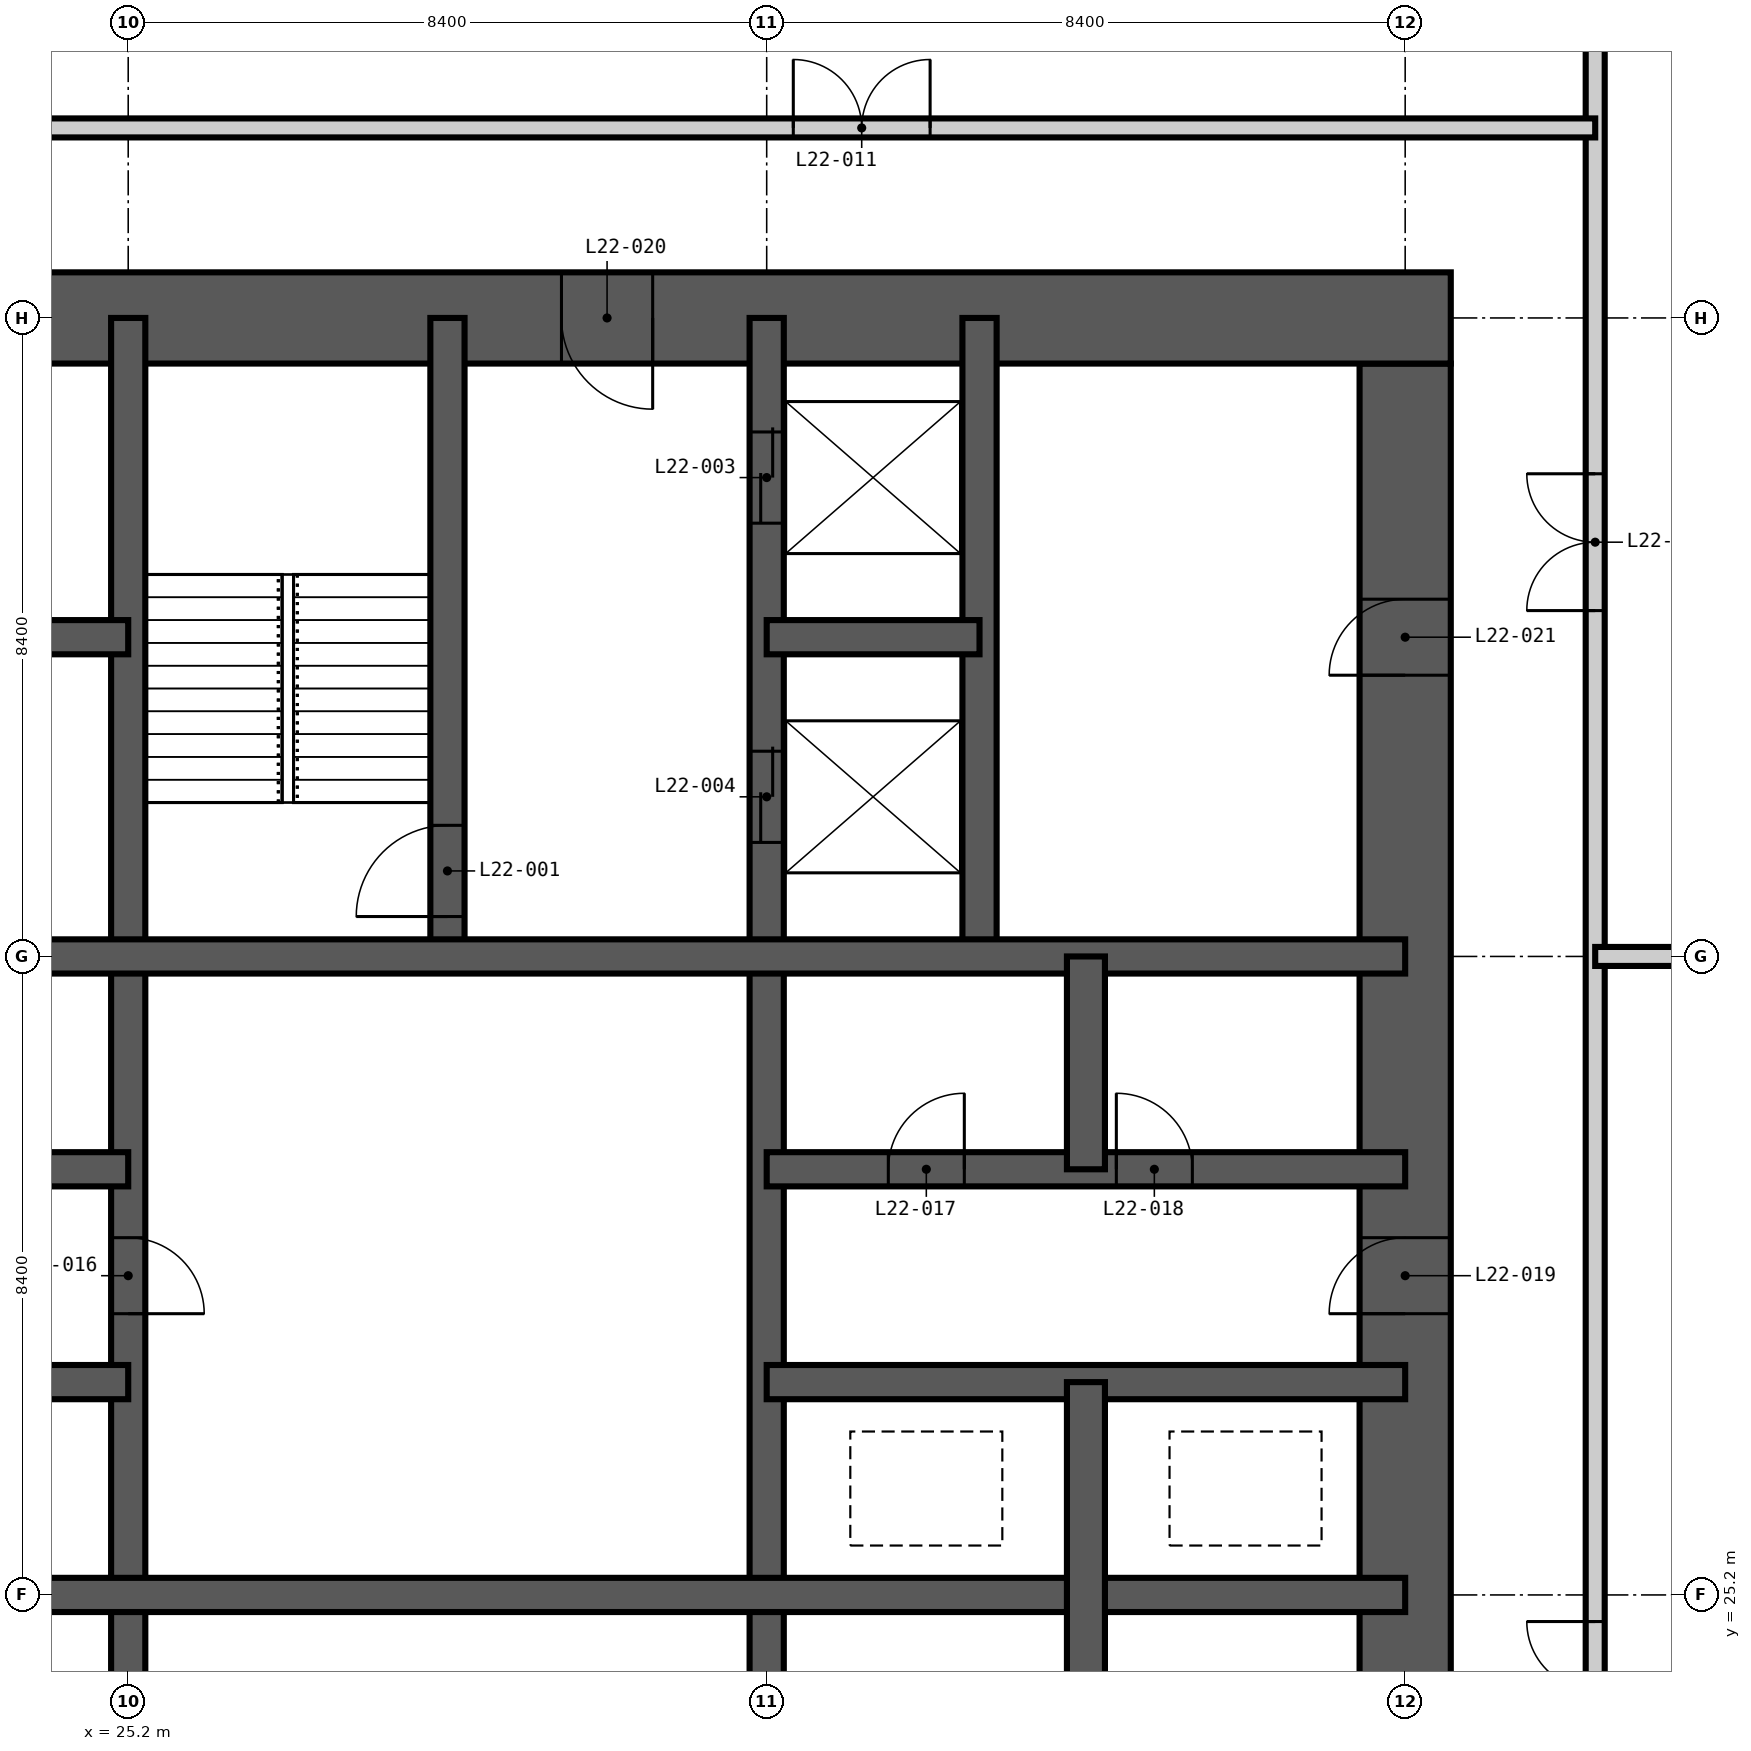
"""IFC4 building model, lengths in metres.
Left out: names, types, materials, properties, quantities, classifications, styles, units other than length and angle.
Written with IfcOpenShell. Run it as: python <this file> out.ifc"""

import sys

from ifc_helpers import new_model, si_unit, direction, frame, frame_2d, origin, place, context, subcontext, project, spatial, rectangle, extrude, element, fill, save


model = new_model("IFC4")
c1 = context("Model", 3, precision=1e-05, world=origin(), true_north=direction((0.0, 1.0)))
c2 = subcontext(c1, "Body", "Model", "MODEL_VIEW")
j1 = project(units=[si_unit("LENGTHUNIT", "METRE"), si_unit("PLANEANGLEUNIT", "RADIAN")], contexts=[c1])
p1 = place(None, origin())
s1 = spatial("IfcSite", under=j1, at=p1, CompositionType="ELEMENT")
p2 = place(p1, origin())
s2 = spatial("IfcBuilding", under=s1, at=p2, CompositionType="ELEMENT")
p3 = place(p2, frame((0.0, 0.0, 88.2)))
s3 = spatial("IfcBuildingStorey", under=s2, at=p3, CompositionType="ELEMENT", Elevation=88.2)
p4 = place(p3, frame((42.0, 17.4, -0.4), z_axis=(0.0, 0.0, 1.0), x_axis=(0.0, 1.0, 0.0)))
e1 = element("IfcWall", 1, at=p4, inside=s3, PredefinedType="SHEAR", context=c2, shape_type="SweptSolid", body=[
    extrude(rectangle(XDim=24.0, YDim=1.2, at=frame_2d((12.0, 0.0))), origin(), (0.0, 0.0, 1.0), 5.45),
])
p5 = place(p4, frame((0.2, 0.0, 0.4)))
e2 = element("IfcOpeningElement", 2, at=p5, cuts=e1, PredefinedType="OPENING", context=c2, shape_type="SweptSolid", body=[
    extrude(rectangle(XDim=1.2, YDim=2.2, at=frame_2d((0.6, 1.1))), frame((0.0, 0.61, 0.0), z_axis=(0.0, -1.0, 0.0), x_axis=(1.0, 0.0, 0.0)), (0.0, 0.0, 1.0), 1.22),
])
p6 = place(p4, frame((11.5, 0.0, 0.4)))
e3 = element("IfcOpeningElement", 3, at=p6, cuts=e1, PredefinedType="OPENING", context=c2, shape_type="SweptSolid", body=[
    extrude(rectangle(XDim=1.0, YDim=2.1, at=frame_2d((0.5, 1.05))), frame((0.0, 0.61, 0.0), z_axis=(0.0, -1.0, 0.0), x_axis=(1.0, 0.0, 0.0)), (0.0, 0.0, 1.0), 1.22),
])
p7 = place(p4, frame((19.9, 0.0, 0.4)))
e4 = element("IfcOpeningElement", 4, at=p7, cuts=e1, PredefinedType="OPENING", context=c2, shape_type="SweptSolid", body=[
    extrude(rectangle(XDim=1.0, YDim=2.1, at=frame_2d((0.5, 1.05))), frame((0.0, 0.61, 0.0), z_axis=(0.0, -1.0, 0.0), x_axis=(1.0, 0.0, 0.0)), (0.0, 0.0, 1.0), 1.22),
])
p8 = place(p3, frame((42.6, 42.0, -0.4), z_axis=(0.0, 0.0, 1.0), x_axis=(-1.0, 0.0, 0.0)))
e5 = element("IfcWall", 5, at=p8, inside=s3, PredefinedType="SHEAR", context=c2, shape_type="SweptSolid", body=[
    extrude(rectangle(XDim=26.4, YDim=1.2, at=frame_2d((13.2, 0.0))), origin(), (0.0, 0.0, 1.0), 5.45),
])
p9 = place(p8, frame((21.1, 0.0, 0.4)))
e6 = element("IfcOpeningElement", 6, at=p9, cuts=e5, PredefinedType="OPENING", context=c2, shape_type="SweptSolid", body=[
    extrude(rectangle(XDim=1.0, YDim=2.1, at=frame_2d((0.5, 1.05))), frame((0.0, 0.61, 0.0), z_axis=(0.0, -1.0, 0.0), x_axis=(1.0, 0.0, 0.0)), (0.0, 0.0, 1.0), 1.22),
])
p10 = place(p8, frame((10.5, 0.0, 0.4)))
e7 = element("IfcOpeningElement", 7, at=p10, cuts=e5, PredefinedType="OPENING", context=c2, shape_type="SweptSolid", body=[
    extrude(rectangle(XDim=1.2, YDim=2.2, at=frame_2d((0.6, 1.1))), frame((0.0, 0.61, 0.0), z_axis=(0.0, -1.0, 0.0), x_axis=(1.0, 0.0, 0.0)), (0.0, 0.0, 1.0), 1.22),
])
p11 = place(p3, frame((25.2, 16.8, -0.4), z_axis=(0.0, 0.0, 1.0), x_axis=(0.0, 1.0, 0.0)))
e8 = element("IfcWall", 8, at=p11, inside=s3, PredefinedType="SHEAR", context=c2, shape_type="SweptSolid", body=[
    extrude(rectangle(XDim=25.2, YDim=0.45, at=frame_2d((12.6, 0.0))), origin(), (0.0, 0.0, 1.0), 5.45),
])
p12 = place(p11, frame((12.1, 0.0, 0.4)))
e9 = element("IfcOpeningElement", 9, at=p12, cuts=e8, PredefinedType="OPENING", context=c2, shape_type="SweptSolid", body=[
    extrude(rectangle(XDim=1.0, YDim=2.1, at=frame_2d((0.5, 1.05))), frame((0.0, 0.235, 0.0), z_axis=(0.0, -1.0, 0.0), x_axis=(1.0, 0.0, 0.0)), (0.0, 0.0, 1.0), 0.47),
])
p13 = place(p3, frame((29.4, 33.6, -0.4), z_axis=(0.0, 0.0, 1.0), x_axis=(0.0, 1.0, 0.0)))
e10 = element("IfcWall", 10, at=p13, inside=s3, PredefinedType="SHEAR", context=c2, shape_type="SweptSolid", body=[
    extrude(rectangle(XDim=8.4, YDim=0.45, at=frame_2d((4.2, 0.0))), origin(), (0.0, 0.0, 1.0), 5.45),
])
p14 = place(p13, frame((0.525, 0.0, 0.4)))
e11 = element("IfcOpeningElement", 11, at=p14, cuts=e10, PredefinedType="OPENING", context=c2, shape_type="SweptSolid", body=[
    extrude(rectangle(XDim=1.2, YDim=2.2, at=frame_2d((0.6, 1.1))), frame((0.0, 0.235, 0.0), z_axis=(0.0, -1.0, 0.0), x_axis=(1.0, 0.0, 0.0)), (0.0, 0.0, 1.0), 0.47),
])
p15 = place(p3, frame((33.6, 16.8, -0.4), z_axis=(0.0, 0.0, 1.0), x_axis=(0.0, 1.0, 0.0)))
e12 = element("IfcWall", 12, at=p15, inside=s3, PredefinedType="SHEAR", context=c2, shape_type="SweptSolid", body=[
    extrude(rectangle(XDim=25.2, YDim=0.45, at=frame_2d((12.6, 0.0))), origin(), (0.0, 0.0, 1.0), 5.45),
])
p16 = place(p15, frame((22.5, 0.0, 0.4)))
e13 = element("IfcOpeningElement", 13, at=p16, cuts=e12, PredefinedType="OPENING", context=c2, shape_type="SweptSolid", body=[
    extrude(rectangle(XDim=1.2, YDim=2.2, at=frame_2d((0.6, 1.1))), frame((0.0, 0.235, 0.0), z_axis=(0.0, -1.0, 0.0), x_axis=(1.0, 0.0, 0.0)), (0.0, 0.0, 1.0), 0.47),
])
p17 = place(p15, frame((18.3, 0.0, 0.4)))
e14 = element("IfcOpeningElement", 14, at=p17, cuts=e12, PredefinedType="OPENING", context=c2, shape_type="SweptSolid", body=[
    extrude(rectangle(XDim=1.2, YDim=2.2, at=frame_2d((0.6, 1.1))), frame((0.0, 0.235, 0.0), z_axis=(0.0, -1.0, 0.0), x_axis=(1.0, 0.0, 0.0)), (0.0, 0.0, 1.0), 0.47),
])
p18 = place(p3, frame((36.4, 33.6, -0.4), z_axis=(0.0, 0.0, 1.0), x_axis=(0.0, 1.0, 0.0)))
e15 = element("IfcWall", 15, at=p18, inside=s3, PredefinedType="SHEAR", context=c2, shape_type="SweptSolid", body=[
    extrude(rectangle(XDim=8.4, YDim=0.45, at=frame_2d((4.2, 0.0))), origin(), (0.0, 0.0, 1.0), 5.45),
])
p19 = place(p3, frame((16.8, 25.2, -0.4), z_axis=(0.0, 0.0, 1.0), x_axis=(1.0, 0.0, 0.0)))
e16 = element("IfcWall", 16, at=p19, inside=s3, PredefinedType="SHEAR", context=c2, shape_type="SweptSolid", body=[
    extrude(rectangle(XDim=25.2, YDim=0.45, at=frame_2d((12.6, 0.0))), origin(), (0.0, 0.0, 1.0), 5.45),
])
for number, where, z_axis, x_axis in (
    (17, (16.8, 28.0, -0.4), (0.0, 0.0, 1.0), (1.0, 0.0, 0.0)),
    (18, (33.6, 28.0, -0.4), (0.0, 0.0, 1.0), (1.0, 0.0, 0.0)),
    (19, (16.8, 30.8, -0.4), (0.0, 0.0, 1.0), (1.0, 0.0, 0.0)),
):
    element("IfcWall", number, at=place(p3, frame(where, z_axis=z_axis, x_axis=x_axis)), inside=s3, PredefinedType="SHEAR", context=c2, shape_type="SweptSolid", body=[
        extrude(rectangle(XDim=8.4, YDim=0.45, at=frame_2d((4.2, 0.0))), origin(), (0.0, 0.0, 1.0), 5.45),
    ])
p20 = place(p3, frame((33.6, 30.8, -0.4), z_axis=(0.0, 0.0, 1.0), x_axis=(1.0, 0.0, 0.0)))
e20 = element("IfcWall", 20, at=p20, inside=s3, PredefinedType="SHEAR", context=c2, shape_type="SweptSolid", body=[
    extrude(rectangle(XDim=8.4, YDim=0.45, at=frame_2d((4.2, 0.0))), origin(), (0.0, 0.0, 1.0), 5.45),
])
p21 = place(p20, frame((1.6, 0.0, 0.4)))
e21 = element("IfcOpeningElement", 21, at=p21, cuts=e20, PredefinedType="OPENING", context=c2, shape_type="SweptSolid", body=[
    extrude(rectangle(XDim=1.0, YDim=2.1, at=frame_2d((0.5, 1.05))), frame((0.0, 0.235, 0.0), z_axis=(0.0, -1.0, 0.0), x_axis=(1.0, 0.0, 0.0)), (0.0, 0.0, 1.0), 0.47),
])
p22 = place(p20, frame((4.6, 0.0, 0.4)))
e22 = element("IfcOpeningElement", 22, at=p22, cuts=e20, PredefinedType="OPENING", context=c2, shape_type="SweptSolid", body=[
    extrude(rectangle(XDim=1.0, YDim=2.1, at=frame_2d((0.5, 1.05))), frame((0.0, 0.235, 0.0), z_axis=(0.0, -1.0, 0.0), x_axis=(1.0, 0.0, 0.0)), (0.0, 0.0, 1.0), 0.47),
])
p23 = place(p3, frame((16.8, 33.6, -0.4), z_axis=(0.0, 0.0, 1.0), x_axis=(1.0, 0.0, 0.0)))
e23 = element("IfcWall", 23, at=p23, inside=s3, PredefinedType="SHEAR", context=c2, shape_type="SweptSolid", body=[
    extrude(rectangle(XDim=25.2, YDim=0.45, at=frame_2d((12.6, 0.0))), origin(), (0.0, 0.0, 1.0), 5.45),
])
p24 = place(p3, frame((16.8, 37.8, -0.4), z_axis=(0.0, 0.0, 1.0), x_axis=(1.0, 0.0, 0.0)))
e24 = element("IfcWall", 24, at=p24, inside=s3, PredefinedType="SHEAR", context=c2, shape_type="SweptSolid", body=[
    extrude(rectangle(XDim=8.4, YDim=0.45, at=frame_2d((4.2, 0.0))), origin(), (0.0, 0.0, 1.0), 5.45),
])
p25 = place(p3, frame((33.6, 37.8, -0.4), z_axis=(0.0, 0.0, 1.0), x_axis=(1.0, 0.0, 0.0)))
e25 = element("IfcWall", 25, at=p25, inside=s3, PredefinedType="SHEAR", context=c2, shape_type="SweptSolid", body=[
    extrude(rectangle(XDim=2.8, YDim=0.45, at=frame_2d((1.4, 0.0))), origin(), (0.0, 0.0, 1.0), 5.45),
])
p26 = place(p3, frame((37.8, 16.8, -0.4), z_axis=(0.0, 0.0, 1.0), x_axis=(0.0, 1.0, 0.0)))
e26 = element("IfcWall", 26, at=p26, inside=s3, PredefinedType="SHEAR", context=c2, shape_type="SweptSolid", body=[
    extrude(rectangle(XDim=11.2, YDim=0.5, at=frame_2d((5.6, 0.0))), origin(), (0.0, 0.0, 1.0), 5.45),
])
p27 = place(p3, frame((37.8, 30.8, -0.4), z_axis=(0.0, 0.0, 1.0), x_axis=(0.0, 1.0, 0.0)))
e27 = element("IfcWall", 27, at=p27, inside=s3, PredefinedType="SHEAR", context=c2, shape_type="SweptSolid", body=[
    extrude(rectangle(XDim=2.8, YDim=0.5, at=frame_2d((1.4, 0.0))), origin(), (0.0, 0.0, 1.0), 5.45),
])
p28 = place(p3, frame((44.5, -0.018, 0.0), z_axis=(0.0, 0.0, 1.0), x_axis=(0.0, 1.0, 0.0)))
e28 = element("IfcWall", 28, at=p28, inside=s3, PredefinedType="PARTITIONING", context=c2, shape_type="SweptSolid", body=[
    extrude(rectangle(XDim=58.836, YDim=0.25, at=frame_2d((29.418, 0.0))), origin(), (0.0, 0.0, 1.0), 5.05),
])
p29 = place(p28, frame((23.068, 0.0, 0.0)))
e29 = element("IfcOpeningElement", 29, at=p29, cuts=e28, PredefinedType="OPENING", context=c2, shape_type="SweptSolid", body=[
    extrude(rectangle(XDim=1.8, YDim=2.4, at=frame_2d((0.9, 1.2))), frame((0.0, 0.135, 0.0), z_axis=(0.0, -1.0, 0.0), x_axis=(1.0, 0.0, 0.0)), (0.0, 0.0, 1.0), 0.27),
])
p30 = place(p28, frame((38.168, 0.0, 0.0)))
e30 = element("IfcOpeningElement", 30, at=p30, cuts=e28, PredefinedType="OPENING", context=c2, shape_type="SweptSolid", body=[
    extrude(rectangle(XDim=1.8, YDim=2.4, at=frame_2d((0.9, 1.2))), frame((0.0, 0.135, 0.0), z_axis=(0.0, -1.0, 0.0), x_axis=(1.0, 0.0, 0.0)), (0.0, 0.0, 1.0), 0.27),
])
p31 = place(p3, frame((44.5, 33.6, 0.0), z_axis=(0.0, 0.0, 1.0), x_axis=(1.0, 0.0, 0.0)))
e31 = element("IfcWall", 31, at=p31, inside=s3, PredefinedType="PARTITIONING", context=c2, shape_type="SweptSolid", body=[
    extrude(rectangle(XDim=14.318, YDim=0.25, at=frame_2d((7.159, 0.0))), origin(), (0.0, 0.0, 1.0), 5.05),
])
p32 = place(p3, frame((14.3, 44.5, 0.0), z_axis=(0.0, 0.0, 1.0), x_axis=(1.0, 0.0, 0.0)))
e32 = element("IfcWall", 32, at=p32, inside=s3, PredefinedType="PARTITIONING", context=c2, shape_type="SweptSolid", body=[
    extrude(rectangle(XDim=30.2, YDim=0.25, at=frame_2d((15.1, 0.0))), origin(), (0.0, 0.0, 1.0), 5.05),
])
p33 = place(p32, frame((19.65, 0.0, 0.0)))
e33 = element("IfcOpeningElement", 33, at=p33, cuts=e32, PredefinedType="OPENING", context=c2, shape_type="SweptSolid", body=[
    extrude(rectangle(XDim=1.8, YDim=2.4, at=frame_2d((0.9, 1.2))), frame((0.0, 0.135, 0.0), z_axis=(0.0, -1.0, 0.0), x_axis=(1.0, 0.0, 0.0)), (0.0, 0.0, 1.0), 0.27),
])
p34 = place(p14, origin())
e34 = element("IfcDoor", 34, at=p34, inside=s3, OperationType="SINGLE_SWING_LEFT", PredefinedType="DOOR", context=c2, shape_type="SweptSolid", body=[
    extrude(rectangle(XDim=1.2, YDim=2.2, at=frame_2d((0.6, 1.1))), frame((0.0, 0.025, 0.0), z_axis=(0.0, -1.0, 0.0), x_axis=(1.0, 0.0, 0.0)), (0.0, 0.0, 1.0), 0.05),
])
fill(e11, e34)
p35 = place(p16, origin())
e35 = element("IfcDoor", 35, at=p35, inside=s3, OperationType="DOUBLE_DOOR_SLIDING", PredefinedType="DOOR", context=c2, shape_type="SweptSolid", body=[
    extrude(rectangle(XDim=1.2, YDim=2.2, at=frame_2d((0.6, 1.1))), frame((0.0, 0.025, 0.0), z_axis=(0.0, -1.0, 0.0), x_axis=(1.0, 0.0, 0.0)), (0.0, 0.0, 1.0), 0.05),
])
fill(e13, e35)
p36 = place(p17, origin())
e36 = element("IfcDoor", 36, at=p36, inside=s3, OperationType="DOUBLE_DOOR_SLIDING", PredefinedType="DOOR", context=c2, shape_type="SweptSolid", body=[
    extrude(rectangle(XDim=1.2, YDim=2.2, at=frame_2d((0.6, 1.1))), frame((0.0, 0.025, 0.0), z_axis=(0.0, -1.0, 0.0), x_axis=(1.0, 0.0, 0.0)), (0.0, 0.0, 1.0), 0.05),
])
fill(e14, e36)
p37 = place(p29, origin())
e37 = element("IfcDoor", 37, at=p37, inside=s3, OperationType="DOUBLE_DOOR_DOUBLE_SWING", PredefinedType="DOOR", context=c2, shape_type="SweptSolid", body=[
    extrude(rectangle(XDim=1.8, YDim=2.4, at=frame_2d((0.9, 1.2))), frame((0.0, 0.025, 0.0), z_axis=(0.0, -1.0, 0.0), x_axis=(1.0, 0.0, 0.0)), (0.0, 0.0, 1.0), 0.05),
])
fill(e29, e37)
p38 = place(p30, origin())
e38 = element("IfcDoor", 38, at=p38, inside=s3, OperationType="DOUBLE_DOOR_DOUBLE_SWING", PredefinedType="DOOR", context=c2, shape_type="SweptSolid", body=[
    extrude(rectangle(XDim=1.8, YDim=2.4, at=frame_2d((0.9, 1.2))), frame((0.0, 0.025, 0.0), z_axis=(0.0, -1.0, 0.0), x_axis=(1.0, 0.0, 0.0)), (0.0, 0.0, 1.0), 0.05),
])
fill(e30, e38)
p39 = place(p33, origin())
e39 = element("IfcDoor", 39, at=p39, inside=s3, OperationType="DOUBLE_DOOR_DOUBLE_SWING", PredefinedType="DOOR", context=c2, shape_type="SweptSolid", body=[
    extrude(rectangle(XDim=1.8, YDim=2.4, at=frame_2d((0.9, 1.2))), frame((0.0, 0.025, 0.0), z_axis=(0.0, -1.0, 0.0), x_axis=(1.0, 0.0, 0.0)), (0.0, 0.0, 1.0), 0.05),
])
fill(e33, e39)
p40 = place(p12, frame((1.0, 0.0, 0.0), z_axis=(0.0, 0.0, 1.0), x_axis=(-1.0, 0.0, 0.0)))
e40 = element("IfcDoor", 40, at=p40, inside=s3, OperationType="SINGLE_SWING_RIGHT", PredefinedType="DOOR", context=c2, shape_type="SweptSolid", body=[
    extrude(rectangle(XDim=1.0, YDim=2.1, at=frame_2d((0.5, 1.05))), frame((0.0, 0.025, 0.0), z_axis=(0.0, -1.0, 0.0), x_axis=(1.0, 0.0, 0.0)), (0.0, 0.0, 1.0), 0.05),
])
fill(e9, e40)
p41 = place(p21, origin())
e41 = element("IfcDoor", 41, at=p41, inside=s3, OperationType="SINGLE_SWING_RIGHT", PredefinedType="DOOR", context=c2, shape_type="SweptSolid", body=[
    extrude(rectangle(XDim=1.0, YDim=2.1, at=frame_2d((0.5, 1.05))), frame((0.0, 0.025, 0.0), z_axis=(0.0, -1.0, 0.0), x_axis=(1.0, 0.0, 0.0)), (0.0, 0.0, 1.0), 0.05),
])
fill(e21, e41)
p42 = place(p22, origin())
e42 = element("IfcDoor", 42, at=p42, inside=s3, OperationType="SINGLE_SWING_LEFT", PredefinedType="DOOR", context=c2, shape_type="SweptSolid", body=[
    extrude(rectangle(XDim=1.0, YDim=2.1, at=frame_2d((0.5, 1.05))), frame((0.0, 0.025, 0.0), z_axis=(0.0, -1.0, 0.0), x_axis=(1.0, 0.0, 0.0)), (0.0, 0.0, 1.0), 0.05),
])
fill(e22, e42)
p43 = place(p6, origin())
e43 = element("IfcDoor", 43, at=p43, inside=s3, OperationType="SINGLE_SWING_LEFT", PredefinedType="DOOR", context=c2, shape_type="SweptSolid", body=[
    extrude(rectangle(XDim=1.0, YDim=2.1, at=frame_2d((0.5, 1.05))), frame((0.0, 0.025, 0.0), z_axis=(0.0, -1.0, 0.0), x_axis=(1.0, 0.0, 0.0)), (0.0, 0.0, 1.0), 0.05),
])
fill(e3, e43)
p44 = place(p10, origin())
e44 = element("IfcDoor", 44, at=p44, inside=s3, OperationType="SINGLE_SWING_LEFT", PredefinedType="DOOR", context=c2, shape_type="SweptSolid", body=[
    extrude(rectangle(XDim=1.2, YDim=2.2, at=frame_2d((0.6, 1.1))), frame((0.0, 0.025, 0.0), z_axis=(0.0, -1.0, 0.0), x_axis=(1.0, 0.0, 0.0)), (0.0, 0.0, 1.0), 0.05),
])
fill(e7, e44)
p45 = place(p7, origin())
e45 = element("IfcDoor", 45, at=p45, inside=s3, OperationType="SINGLE_SWING_LEFT", PredefinedType="DOOR", context=c2, shape_type="SweptSolid", body=[
    extrude(rectangle(XDim=1.0, YDim=2.1, at=frame_2d((0.5, 1.05))), frame((0.0, 0.025, 0.0), z_axis=(0.0, -1.0, 0.0), x_axis=(1.0, 0.0, 0.0)), (0.0, 0.0, 1.0), 0.05),
])
fill(e4, e45)
save(model, sys.argv[1])
